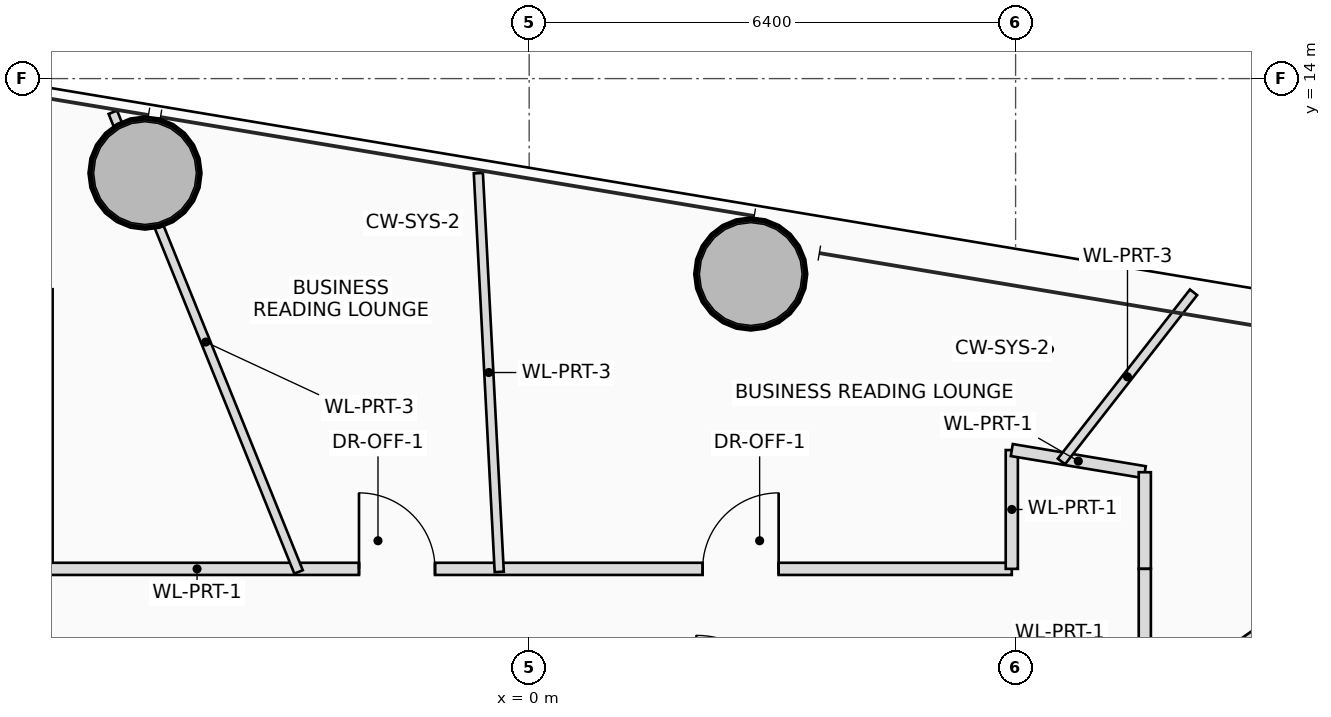
"""IFC4 building model, lengths in metres.
Left out: names, types, materials, properties, quantities, classifications, styles, units other than length and angle.
Written with IfcOpenShell. Run it as: python <this file> out.ifc"""

import sys

from ifc_helpers import new_model, si_unit, direction, frame, frame_2d, origin, origin_2d, place, context, subcontext, project, spatial, rectangle, hollow_circle, extrude, source, transform, mapped, element, fill, save


model = new_model("IFC4")
c1 = context("Model", 3, precision=1e-05, world=origin(), true_north=direction((0.0, 1.0)))
c2 = subcontext(c1, "Body", "Model", "MODEL_VIEW")
j1 = project(units=[si_unit("LENGTHUNIT", "METRE"), si_unit("PLANEANGLEUNIT", "RADIAN")], contexts=[c1])
p1 = place(None, origin())
s1 = spatial("IfcSite", under=j1, at=p1, CompositionType="ELEMENT")
p2 = place(p1, origin())
s2 = spatial("IfcBuilding", under=s1, at=p2, CompositionType="ELEMENT")
p3 = place(p2, frame((0.0, 0.0, 108.65)))
s3 = spatial("IfcBuildingStorey", under=s2, at=p3, CompositionType="ELEMENT", Elevation=108.65)
m1 = source(origin(), c2, "Body", "SweptSolid", [
    extrude(hollow_circle(Radius=0.725, WallThickness=0.05, at=origin_2d()), origin(), (0.0, 0.0, 1.0), 3.75),
])
for number, where, z_axis, x_axis in (
    (1, (2.915, 11.429, 0.0), (0.0, 0.0, 1.0), (1.0, 0.0, 0.0)),
    (2, (-5.054, 12.757, 0.0), (0.0, 0.0, 1.0), (1.0, 0.0, 0.0)),
):
    element("IfcColumn", number, at=place(p3, frame(where, z_axis=z_axis, x_axis=x_axis)), inside=s3, PredefinedType="COLUMN", context=c2, shape_type="MappedRepresentation", body=[
        mapped(m1, transform((0.0, 0.0, 0.0), scale=1.0)),
    ])
p4 = place(p3, frame((-6.35, 11.229, 0.0), z_axis=(0.0, 0.0, 1.0), x_axis=(0.0, -1.0, 0.0)))
e3 = element("IfcWall", 3, at=p4, inside=s3, PredefinedType="PARTITIONING", context=c2, shape_type="SweptSolid", body=[
    extrude(rectangle(XDim=3.679, YDim=0.16, at=frame_2d((1.84, 0.0))), origin(), (0.0, 0.0, 1.0), 3.05),
])
p5 = place(p3, frame((-6.35, 7.55, 0.0), z_axis=(0.0, 0.0, 1.0), x_axis=(1.0, 0.0, 0.0)))
e4 = element("IfcWall", 4, at=p5, inside=s3, PredefinedType="PARTITIONING", context=c2, shape_type="SweptSolid", body=[
    extrude(rectangle(XDim=12.7, YDim=0.16, at=frame_2d((6.35, 0.0))), origin(), (0.0, 0.0, 1.0), 2.85),
])
p6 = place(p5, frame((4.111, 0.0, 0.0)))
e5 = element("IfcOpeningElement", 5, at=p6, cuts=e4, PredefinedType="OPENING", context=c2, shape_type="SweptSolid", body=[
    extrude(rectangle(XDim=1.0, YDim=2.25, at=frame_2d((0.5, 1.125))), frame((0.0, 0.09, 0.0), z_axis=(0.0, -1.0, 0.0), x_axis=(1.0, 0.0, 0.0)), (0.0, 0.0, 1.0), 0.18),
])
p7 = place(p5, frame((8.632, 0.0, 0.0)))
e6 = element("IfcOpeningElement", 6, at=p7, cuts=e4, PredefinedType="OPENING", context=c2, shape_type="SweptSolid", body=[
    extrude(rectangle(XDim=1.0, YDim=2.25, at=frame_2d((0.5, 1.125))), frame((0.0, 0.09, 0.0), z_axis=(0.0, -1.0, 0.0), x_axis=(1.0, 0.0, 0.0)), (0.0, 0.0, 1.0), 0.18),
])
p8 = place(p3, frame((6.35, 7.55, 0.0), z_axis=(0.0, 0.0, 1.0), x_axis=(0.0, 1.0, 0.0)))
e7 = element("IfcWall", 7, at=p8, inside=s3, PredefinedType="PARTITIONING", context=c2, shape_type="SweptSolid", body=[
    extrude(rectangle(XDim=1.563, YDim=0.16, at=frame_2d((0.781, 0.0))), origin(), (0.0, 0.0, 1.0), 3.05),
])
p9 = place(p3, frame((6.35, 9.113, 0.0), z_axis=(0.0, 0.0, 1.0), x_axis=(0.986386484459, -0.164443617317, 0.0)))
e8 = element("IfcWall", 8, at=p9, inside=s3, PredefinedType="PARTITIONING", context=c2, shape_type="SweptSolid", body=[
    extrude(rectangle(XDim=1.774, YDim=0.16, at=frame_2d((0.887, 0.0))), origin(), (0.0, 0.0, 1.0), 3.2),
])
p10 = place(p3, frame((8.1, 8.821, 0.0), z_axis=(0.0, 0.0, 1.0), x_axis=(0.0, -1.0, 0.0)))
e9 = element("IfcWall", 9, at=p10, inside=s3, PredefinedType="PARTITIONING", context=c2, shape_type="SweptSolid", body=[
    extrude(rectangle(XDim=1.271, YDim=0.16, at=frame_2d((0.636, 0.0))), origin(), (0.0, 0.0, 1.0), 2.85),
])
p11 = place(p3, frame((8.1, 7.55, 0.0), z_axis=(0.0, 0.0, 1.0), x_axis=(0.0, -1.0, 0.0)))
e10 = element("IfcWall", 10, at=p11, inside=s3, PredefinedType="PARTITIONING", context=c2, shape_type="SweptSolid", body=[
    extrude(rectangle(XDim=7.53, YDim=0.16, at=frame_2d((3.765, 0.0))), origin(), (0.0, 0.0, 1.0), 2.85),
])
p12 = place(p11, frame((4.082, 0.0, 0.0)))
e11 = element("IfcOpeningElement", 11, at=p12, cuts=e10, PredefinedType="OPENING", context=c2, shape_type="SweptSolid", body=[
    extrude(rectangle(XDim=1.0, YDim=2.25, at=frame_2d((0.5, 1.125))), frame((0.0, 0.09, 0.0), z_axis=(0.0, -1.0, 0.0), x_axis=(1.0, 0.0, 0.0)), (0.0, 0.0, 1.0), 0.18),
])
p13 = place(p3, frame((8.06, 5.644, 0.0), z_axis=(0.0, 0.0, 1.0), x_axis=(0.819162822725, 0.573561042841, 0.0)))
e12 = element("IfcWall", 12, at=p13, inside=s3, PredefinedType="PARTITIONING", context=c2, shape_type="SweptSolid", body=[
    extrude(rectangle(XDim=7.968, YDim=0.12, at=frame_2d((3.984, 0.0))), origin(), (0.0, 0.0, 1.0), 2.85),
])
p14 = place(p3, frame((7.003, 8.964, 0.0), z_axis=(0.0, 0.0, 1.0), x_axis=(0.615657467661, 0.788013884721, 0.0)))
e13 = element("IfcWall", 13, at=p14, inside=s3, PredefinedType="PARTITIONING", context=c2, shape_type="SweptSolid", body=[
    extrude(rectangle(XDim=2.823, YDim=0.12, at=frame_2d((1.412, 0.0))), origin(), (0.0, 0.0, 1.0), 3.01),
])
p15 = place(p3, frame((-0.394, 7.51, 0.0), z_axis=(0.0, 0.0, 1.0), x_axis=(-0.052329543677, 0.998629870802, 0.0)))
e14 = element("IfcWall", 14, at=p15, inside=s3, PredefinedType="PARTITIONING", context=c2, shape_type="SweptSolid", body=[
    extrude(rectangle(XDim=5.253, YDim=0.12, at=frame_2d((2.626, 0.0))), origin(), (0.0, 0.0, 1.0), 3.01),
])
p16 = place(p3, frame((-3.034, 7.51, 0.0), z_axis=(0.0, 0.0, 1.0), x_axis=(-0.37460229318, 0.927185591963, 0.0)))
e15 = element("IfcWall", 15, at=p16, inside=s3, PredefinedType="PARTITIONING", context=c2, shape_type="SweptSolid", body=[
    extrude(rectangle(XDim=6.522, YDim=0.12, at=frame_2d((3.261, 0.0))), origin(), (0.0, 0.0, 1.0), 3.05),
])
p17 = place(p6, origin())
e16 = element("IfcDoor", 16, at=p17, inside=s3, OperationType="SINGLE_SWING_LEFT", PredefinedType="DOOR", context=c2, shape_type="SweptSolid", body=[
    extrude(rectangle(XDim=1.0, YDim=2.25, at=frame_2d((0.5, 1.125))), frame((0.0, 0.025, 0.0), z_axis=(0.0, -1.0, 0.0), x_axis=(1.0, 0.0, 0.0)), (0.0, 0.0, 1.0), 0.05),
])
fill(e5, e16)
p18 = place(p7, origin())
e17 = element("IfcDoor", 17, at=p18, inside=s3, OperationType="SINGLE_SWING_RIGHT", PredefinedType="DOOR", context=c2, shape_type="SweptSolid", body=[
    extrude(rectangle(XDim=1.0, YDim=2.25, at=frame_2d((0.5, 1.125))), frame((0.0, 0.025, 0.0), z_axis=(0.0, -1.0, 0.0), x_axis=(1.0, 0.0, 0.0)), (0.0, 0.0, 1.0), 0.05),
])
fill(e6, e17)
save(model, sys.argv[1])
